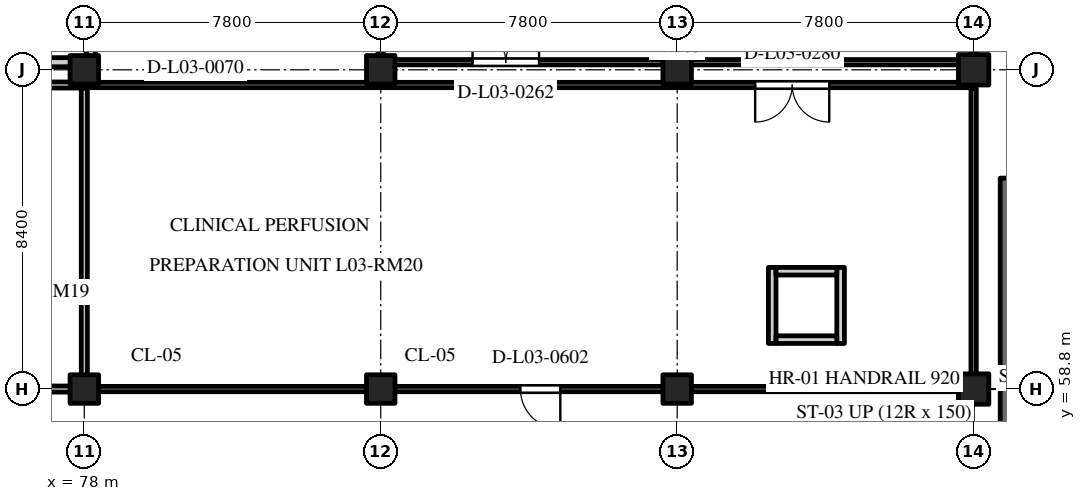
"""IFC4 building model, lengths in metres.
Left out: names, types, materials, properties, quantities, classifications, styles, units other than length and angle.
Written with IfcOpenShell. Run it as: python <this file> out.ifc"""

import sys

from ifc_helpers import new_model, si_unit, direction, frame, frame_2d, origin, origin_2d, place, context, subcontext, project, spatial, rectangle, extrude, element, fill, save


model = new_model("IFC4")
c1 = context("Model", 3, precision=1e-05, world=origin(), true_north=direction((0.0, 1.0)))
c2 = subcontext(c1, "Body", "Model", "MODEL_VIEW")
j1 = project(units=[si_unit("LENGTHUNIT", "METRE"), si_unit("PLANEANGLEUNIT", "RADIAN")], contexts=[c1])
p1 = place(None, origin())
s1 = spatial("IfcSite", under=j1, at=p1, CompositionType="ELEMENT")
p2 = place(p1, origin())
s2 = spatial("IfcBuilding", under=s1, at=p2, CompositionType="ELEMENT")
p3 = place(p2, frame((0.0, 0.0, 14.4)))
s3 = spatial("IfcBuildingStorey", under=s2, at=p3, CompositionType="ELEMENT", Elevation=14.4)
for number, where, z_axis, x_axis in (
    (1, (78.0, 58.8, 0.0), (0.0, 0.0, 1.0), (1.0, 0.0, 0.0)),
    (2, (78.0, 67.2, 0.0), (0.0, 0.0, 1.0), (1.0, 0.0, 0.0)),
    (3, (85.8, 58.8, 0.0), (0.0, 0.0, 1.0), (1.0, 0.0, 0.0)),
    (4, (85.8, 67.2, 0.0), (0.0, 0.0, 1.0), (1.0, 0.0, 0.0)),
    (5, (93.6, 58.8, 0.0), (0.0, 0.0, 1.0), (1.0, 0.0, 0.0)),
    (6, (93.6, 67.2, 0.0), (0.0, 0.0, 1.0), (1.0, 0.0, 0.0)),
):
    element("IfcColumn", number, at=place(p3, frame(where, z_axis=z_axis, x_axis=x_axis)), inside=s3, PredefinedType="COLUMN", context=c2, shape_type="SweptSolid", body=[
        extrude(rectangle(XDim=0.75, YDim=0.75, at=origin_2d()), origin(), (0.0, 0.0, 1.0), 3.6),
    ])
for number, where, z_axis, x_axis in (
    (7, (101.4, 58.8, 0.0), (0.0, 0.0, 1.0), (1.0, 0.0, 0.0)),
    (8, (101.4, 67.2, 0.0), (0.0, 0.0, 1.0), (1.0, 0.0, 0.0)),
):
    element("IfcColumn", number, at=place(p3, frame(where, z_axis=z_axis, x_axis=x_axis)), inside=s3, PredefinedType="COLUMN", context=c2, shape_type="SweptSolid", body=[
        extrude(rectangle(XDim=0.8, YDim=0.8, at=origin_2d()), origin(), (0.0, 0.0, 1.0), 3.6),
    ])
p4 = place(p3, frame((102.275, 53.85, 0.0), z_axis=(0.0, 0.0, 1.0), x_axis=(0.0, 1.0, 0.0)))
e9 = element("IfcWall", 9, at=p4, inside=s3, PredefinedType="SHEAR", context=c2, shape_type="SweptSolid", body=[
    extrude(rectangle(XDim=10.5, YDim=0.35, at=frame_2d((5.25, 0.0))), origin(), (0.0, 0.0, 1.0), 3.6),
])
for number, where, z_axis, x_axis in (
    (10, (96.1, 60.0, 0.0), (0.0, 0.0, 1.0), (0.0, 1.0, 0.0)),
    (11, (97.9, 60.0, 0.0), (0.0, 0.0, 1.0), (0.0, 1.0, 0.0)),
):
    element("IfcWall", number, at=place(p3, frame(where, z_axis=z_axis, x_axis=x_axis)), inside=s3, PredefinedType="STANDARD", context=c2, shape_type="SweptSolid", body=[
        extrude(rectangle(XDim=2.0, YDim=0.2, at=frame_2d((1.0, 0.0))), origin(), (0.0, 0.0, 1.0), 3.27),
    ])
for number, where, z_axis, x_axis in (
    (12, (96.2, 60.1, 0.0), (0.0, 0.0, 1.0), (1.0, 0.0, 0.0)),
    (13, (96.2, 61.9, 0.0), (0.0, 0.0, 1.0), (1.0, 0.0, 0.0)),
):
    element("IfcWall", number, at=place(p3, frame(where, z_axis=z_axis, x_axis=x_axis)), inside=s3, PredefinedType="STANDARD", context=c2, shape_type="SweptSolid", body=[
        extrude(rectangle(XDim=1.6, YDim=0.2, at=frame_2d((0.8, 0.0))), origin(), (0.0, 0.0, 1.0), 3.27),
    ])
p5 = place(p3, frame((70.51, 67.4, 0.0), z_axis=(0.0, 0.0, 1.0), x_axis=(1.0, 0.0, 0.0)))
e14 = element("IfcWall", 14, at=p5, inside=s3, PredefinedType="STANDARD", context=c2, shape_type="SweptSolid", body=[
    extrude(rectangle(XDim=7.555, YDim=0.24, at=frame_2d((3.777, 0.0))), origin(), (0.0, 0.0, 1.0), 3.25),
])
p6 = place(p5, frame((1.939, 0.0, 0.0)))
e15 = element("IfcOpeningElement", 15, at=p6, cuts=e14, PredefinedType="OPENING", context=c2, shape_type="SweptSolid", body=[
    extrude(rectangle(XDim=1.65, YDim=2.25, at=frame_2d((0.825, 1.125))), frame((0.0, 0.132, 0.0), z_axis=(0.0, -1.0, 0.0), x_axis=(1.0, 0.0, 0.0)), (0.0, 0.0, 1.0), 0.264),
])
p7 = place(p3, frame((78.175, 67.51, 0.0), z_axis=(0.0, 0.0, 1.0), x_axis=(0.0, 1.0, 0.0)))
e16 = element("IfcWall", 16, at=p7, inside=s3, PredefinedType="STANDARD", context=c2, shape_type="SweptSolid", body=[
    extrude(rectangle(XDim=24.78, YDim=0.24, at=frame_2d((12.39, 0.0))), origin(), (0.0, 0.0, 1.0), 2.62),
])
p8 = place(p3, frame((85.885, 67.4, 0.0), z_axis=(0.0, 0.0, 1.0), x_axis=(1.0, 0.0, 0.0)))
e17 = element("IfcWall", 17, at=p8, inside=s3, PredefinedType="PARTITIONING", context=c2, shape_type="SweptSolid", body=[
    extrude(rectangle(XDim=15.43, YDim=0.14, at=frame_2d((7.715, 0.0))), origin(), (0.0, 0.0, 1.0), 3.25),
])
p9 = place(p8, frame((2.331, 0.0, 0.0)))
e18 = element("IfcOpeningElement", 18, at=p9, cuts=e17, PredefinedType="OPENING", context=c2, shape_type="SweptSolid", body=[
    extrude(rectangle(XDim=1.75, YDim=2.3, at=frame_2d((0.875, 1.15))), frame((0.0, 0.082, 0.0), z_axis=(0.0, -1.0, 0.0), x_axis=(1.0, 0.0, 0.0)), (0.0, 0.0, 1.0), 0.164),
])
p10 = place(p3, frame((85.8, 67.485, 0.0), z_axis=(0.0, 0.0, 1.0), x_axis=(0.0, 1.0, 0.0)))
e19 = element("IfcWall", 19, at=p10, inside=s3, PredefinedType="PARTITIONING", context=c2, shape_type="SweptSolid", body=[
    extrude(rectangle(XDim=24.83, YDim=0.14, at=frame_2d((12.415, 0.0))), origin(), (0.0, 0.0, 1.0), 3.25),
])
p11 = place(p3, frame((101.4, 67.485, 0.0), z_axis=(0.0, 0.0, 1.0), x_axis=(0.0, 1.0, 0.0)))
e20 = element("IfcWall", 20, at=p11, inside=s3, PredefinedType="PARTITIONING", context=c2, shape_type="SweptSolid", body=[
    extrude(rectangle(XDim=24.83, YDim=0.14, at=frame_2d((12.415, 0.0))), origin(), (0.0, 0.0, 1.0), 2.62),
])
p12 = place(p3, frame((62.135, 66.8, 0.0), z_axis=(0.0, 0.0, 1.0), x_axis=(1.0, 0.0, 0.0)))
e21 = element("IfcWall", 21, at=p12, inside=s3, PredefinedType="PARTITIONING", context=c2, shape_type="SweptSolid", body=[
    extrude(rectangle(XDim=15.78, YDim=0.16, at=frame_2d((7.89, 0.0))), origin(), (0.0, 0.0, 1.0), 3.25),
])
p13 = place(p12, frame((11.958, 0.0, 0.0)))
e22 = element("IfcOpeningElement", 22, at=p13, cuts=e21, PredefinedType="OPENING", context=c2, shape_type="SweptSolid", body=[
    extrude(rectangle(XDim=1.85, YDim=2.3, at=frame_2d((0.925, 1.15))), frame((0.0, 0.092, 0.0), z_axis=(0.0, -1.0, 0.0), x_axis=(1.0, 0.0, 0.0)), (0.0, 0.0, 1.0), 0.184),
])
p14 = place(p3, frame((62.135, 58.8, 0.0), z_axis=(0.0, 0.0, 1.0), x_axis=(1.0, 0.0, 0.0)))
e23 = element("IfcWall", 23, at=p14, inside=s3, PredefinedType="PARTITIONING", context=c2, shape_type="SweptSolid", body=[
    extrude(rectangle(XDim=15.78, YDim=0.16, at=frame_2d((7.89, 0.0))), origin(), (0.0, 0.0, 1.0), 2.62),
])
p15 = place(p14, frame((3.54, 0.0, 0.0)))
e24 = element("IfcOpeningElement", 24, at=p15, cuts=e23, PredefinedType="OPENING", context=c2, shape_type="SweptSolid", body=[
    extrude(rectangle(XDim=1.08, YDim=2.15, at=frame_2d((0.54, 1.075))), frame((0.0, 0.092, 0.0), z_axis=(0.0, -1.0, 0.0), x_axis=(1.0, 0.0, 0.0)), (0.0, 0.0, 1.0), 0.184),
])
p16 = place(p3, frame((78.0, 58.885, 0.0), z_axis=(0.0, 0.0, 1.0), x_axis=(0.0, 1.0, 0.0)))
e25 = element("IfcWall", 25, at=p16, inside=s3, PredefinedType="PARTITIONING", context=c2, shape_type="SweptSolid", body=[
    extrude(rectangle(XDim=7.83, YDim=0.16, at=frame_2d((3.915, 0.0))), origin(), (0.0, 0.0, 1.0), 2.62),
])
p17 = place(p3, frame((78.085, 66.8, 0.0), z_axis=(0.0, 0.0, 1.0), x_axis=(1.0, 0.0, 0.0)))
e26 = element("IfcWall", 26, at=p17, inside=s3, PredefinedType="PARTITIONING", context=c2, shape_type="SweptSolid", body=[
    extrude(rectangle(XDim=23.23, YDim=0.14, at=frame_2d((11.615, 0.0))), origin(), (0.0, 0.0, 1.0), 3.25),
])
p18 = place(p17, frame((17.567, 0.0, 0.0)))
e27 = element("IfcOpeningElement", 27, at=p18, cuts=e26, PredefinedType="OPENING", context=c2, shape_type="SweptSolid", body=[
    extrude(rectangle(XDim=1.95, YDim=2.35, at=frame_2d((0.975, 1.175))), frame((0.0, 0.082, 0.0), z_axis=(0.0, -1.0, 0.0), x_axis=(1.0, 0.0, 0.0)), (0.0, 0.0, 1.0), 0.164),
])
p19 = place(p3, frame((78.085, 58.8, 0.0), z_axis=(0.0, 0.0, 1.0), x_axis=(1.0, 0.0, 0.0)))
e28 = element("IfcWall", 28, at=p19, inside=s3, PredefinedType="PARTITIONING", context=c2, shape_type="SweptSolid", body=[
    extrude(rectangle(XDim=23.23, YDim=0.14, at=frame_2d((11.615, 0.0))), origin(), (0.0, 0.0, 1.0), 2.62),
])
p20 = place(p19, frame((11.39, 0.0, 0.0)))
e29 = element("IfcOpeningElement", 29, at=p20, cuts=e28, PredefinedType="OPENING", context=c2, shape_type="SweptSolid", body=[
    extrude(rectangle(XDim=1.05, YDim=2.1, at=frame_2d((0.525, 1.05))), frame((0.0, 0.082, 0.0), z_axis=(0.0, -1.0, 0.0), x_axis=(1.0, 0.0, 0.0)), (0.0, 0.0, 1.0), 0.164),
])
p21 = place(p3, frame((101.4, 58.885, 0.0), z_axis=(0.0, 0.0, 1.0), x_axis=(0.0, 1.0, 0.0)))
e30 = element("IfcWall", 30, at=p21, inside=s3, PredefinedType="PARTITIONING", context=c2, shape_type="SweptSolid", body=[
    extrude(rectangle(XDim=7.83, YDim=0.14, at=frame_2d((3.915, 0.0))), origin(), (0.0, 0.0, 1.0), 2.62),
])
p22 = place(p9, origin())
e31 = element("IfcDoor", 31, at=p22, inside=s3, OperationType="DOUBLE_DOOR_SINGLE_SWING", PredefinedType="DOOR", context=c2, shape_type="SweptSolid", body=[
    extrude(rectangle(XDim=1.75, YDim=2.3, at=frame_2d((0.875, 1.15))), frame((0.0, 0.025, 0.0), z_axis=(0.0, -1.0, 0.0), x_axis=(1.0, 0.0, 0.0)), (0.0, 0.0, 1.0), 0.05),
])
fill(e18, e31)
p23 = place(p18, frame((1.95, 0.0, 0.0), z_axis=(0.0, 0.0, 1.0), x_axis=(-1.0, 0.0, 0.0)))
e32 = element("IfcDoor", 32, at=p23, inside=s3, OperationType="DOUBLE_DOOR_SINGLE_SWING", PredefinedType="DOOR", context=c2, shape_type="SweptSolid", body=[
    extrude(rectangle(XDim=1.95, YDim=2.35, at=frame_2d((0.975, 1.175))), frame((0.0, 0.025, 0.0), z_axis=(0.0, -1.0, 0.0), x_axis=(1.0, 0.0, 0.0)), (0.0, 0.0, 1.0), 0.05),
])
fill(e27, e32)
p24 = place(p20, origin())
e33 = element("IfcDoor", 33, at=p24, inside=s3, OperationType="SINGLE_SWING_RIGHT", PredefinedType="DOOR", context=c2, shape_type="SweptSolid", body=[
    extrude(rectangle(XDim=1.05, YDim=2.1, at=frame_2d((0.525, 1.05))), frame((0.0, 0.025, 0.0), z_axis=(0.0, -1.0, 0.0), x_axis=(1.0, 0.0, 0.0)), (0.0, 0.0, 1.0), 0.05),
])
fill(e29, e33)
save(model, sys.argv[1])
